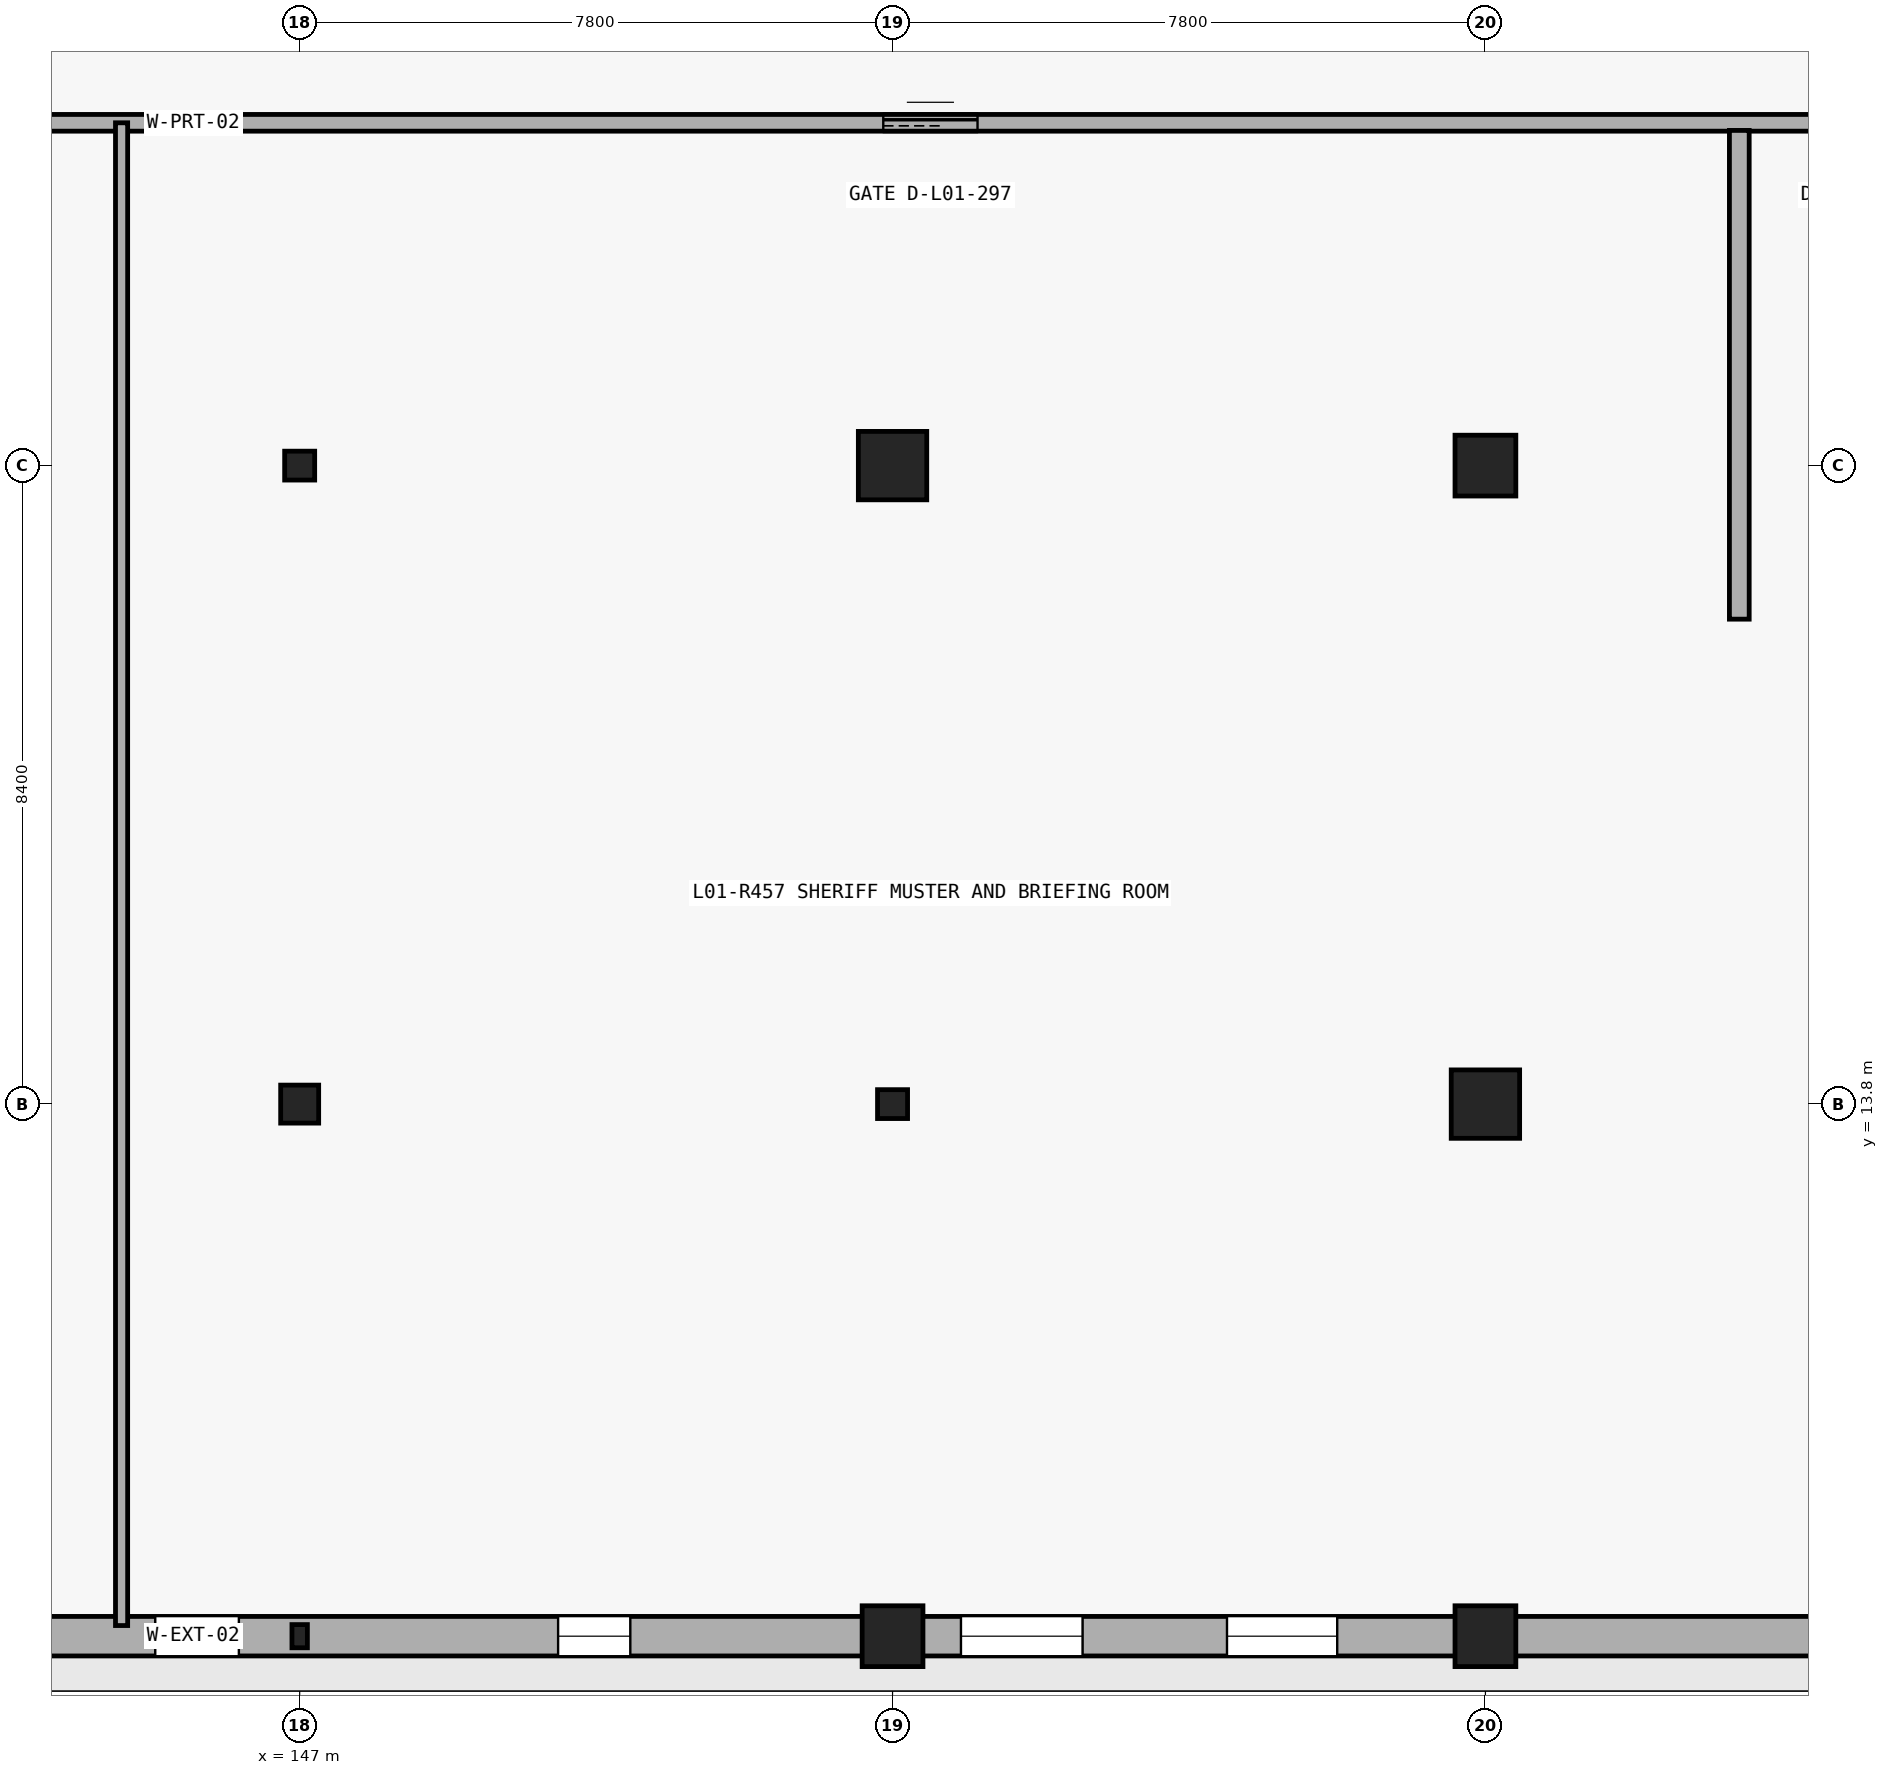
"""IFC4 building model, lengths in metres.
Left out: names, types, materials, properties, quantities, classifications, styles, units other than length and angle.
Written with IfcOpenShell. Run it as: python <this file> out.ifc"""

import sys

from ifc_helpers import new_model, si_unit, direction, frame, frame_2d, origin_with_axes, origin_2d_with_axis, place, context, subcontext, project, spatial, rectangle, hollow_rectangle, circle, i_section, extrude, element, fill, save


model = new_model("IFC4")
c1 = context("Model", 3, precision=1e-05, world=origin_with_axes(), true_north=direction((0.0, 1.0)))
c2 = subcontext(c1, "Body", "Model", "MODEL_VIEW")
j1 = project(units=[si_unit("LENGTHUNIT", "METRE"), si_unit("PLANEANGLEUNIT", "RADIAN")], contexts=[c1])
p1 = place(None, origin_with_axes())
s1 = spatial("IfcSite", under=j1, at=p1, CompositionType="ELEMENT")
p2 = place(p1, origin_with_axes())
s2 = spatial("IfcBuilding", under=s1, at=p2, CompositionType="ELEMENT")
p3 = place(p2, frame((0.0, 0.0, 5.4), z_axis=(0.0, 0.0, 1.0), x_axis=(1.0, 0.0, 0.0)))
s3 = spatial("IfcBuildingStorey", under=s2, at=p3, CompositionType="ELEMENT", Elevation=5.4)
p4 = place(None, frame((121.8, 6.8, 5.4), z_axis=(0.0, 0.0, 1.0), x_axis=(1.0, 0.0, 0.0)))
e1 = element("IfcWall", 1, at=p4, inside=s3, PredefinedType="SOLIDWALL", context=c2, shape_type="SweptSolid", body=[
    extrude(rectangle(XDim=47.6, YDim=0.52, at=frame_2d((23.8, 0.0), x_axis=(1.0, 0.0))), origin_with_axes(), (0.0, 0.0, 1.0), 4.744),
])
p5 = place(None, frame((125.2, 6.8, 8.1), z_axis=(0.0, 0.0, 1.0), x_axis=(1.0, 0.0, 0.0)))
e2 = element("IfcOpeningElement", 2, at=p5, cuts=e1, PredefinedType="OPENING", context=c2, shape_type="SweptSolid", body=[
    extrude(rectangle(XDim=2.4, YDim=1.4, at=frame_2d((0.0, 0.7), x_axis=(1.0, 0.0))), frame((0.0, 0.27, 0.0), z_axis=(0.0, -1.0, 0.0), x_axis=(1.0, 0.0, 0.0)), (0.0, 0.0, 1.0), 0.54),
])
p6 = place(None, frame((128.55, 6.8, 8.1), z_axis=(0.0, 0.0, 1.0), x_axis=(1.0, 0.0, 0.0)))
e3 = element("IfcOpeningElement", 3, at=p6, cuts=e1, PredefinedType="OPENING", context=c2, shape_type="SweptSolid", body=[
    extrude(rectangle(XDim=2.1, YDim=1.3, at=frame_2d((0.0, 0.65), x_axis=(1.0, 0.0))), frame((0.0, 0.27, 0.0), z_axis=(0.0, -1.0, 0.0), x_axis=(1.0, 0.0, 0.0)), (0.0, 0.0, 1.0), 0.54),
])
p7 = place(None, frame((133.7, 6.8, 8.15), z_axis=(0.0, 0.0, 1.0), x_axis=(1.0, 0.0, 0.0)))
e4 = element("IfcOpeningElement", 4, at=p7, cuts=e1, PredefinedType="OPENING", context=c2, shape_type="SweptSolid", body=[
    extrude(rectangle(XDim=1.8, YDim=1.2, at=frame_2d((0.0, 0.6), x_axis=(1.0, 0.0))), frame((0.0, 0.27, 0.0), z_axis=(0.0, -1.0, 0.0), x_axis=(1.0, 0.0, 0.0)), (0.0, 0.0, 1.0), 0.54),
])
p8 = place(None, frame((137.0, 6.8, 6.3), z_axis=(0.0, 0.0, 1.0), x_axis=(1.0, 0.0, 0.0)))
e5 = element("IfcOpeningElement", 5, at=p8, cuts=e1, PredefinedType="OPENING", context=c2, shape_type="SweptSolid", body=[
    extrude(rectangle(XDim=1.4, YDim=2.2, at=frame_2d((0.0, 1.1), x_axis=(1.0, 0.0))), frame((0.0, 0.27, 0.0), z_axis=(0.0, -1.0, 0.0), x_axis=(1.0, 0.0, 0.0)), (0.0, 0.0, 1.0), 0.54),
])
p9 = place(None, frame((142.225, 6.8, 6.3), z_axis=(0.0, 0.0, 1.0), x_axis=(1.0, 0.0, 0.0)))
e6 = element("IfcOpeningElement", 6, at=p9, cuts=e1, PredefinedType="OPENING", context=c2, shape_type="SweptSolid", body=[
    extrude(rectangle(XDim=1.25, YDim=2.1, at=frame_2d((0.0, 1.05), x_axis=(1.0, 0.0))), frame((0.0, 0.27, 0.0), z_axis=(0.0, -1.0, 0.0), x_axis=(1.0, 0.0, 0.0)), (0.0, 0.0, 1.0), 0.54),
])
p10 = place(None, frame((145.65, 6.8, 6.35), z_axis=(0.0, 0.0, 1.0), x_axis=(1.0, 0.0, 0.0)))
e7 = element("IfcOpeningElement", 7, at=p10, cuts=e1, PredefinedType="OPENING", context=c2, shape_type="SweptSolid", body=[
    extrude(rectangle(XDim=1.1, YDim=2.0, at=frame_2d((0.0, 1.0), x_axis=(1.0, 0.0))), frame((0.0, 0.27, 0.0), z_axis=(0.0, -1.0, 0.0), x_axis=(1.0, 0.0, 0.0)), (0.0, 0.0, 1.0), 0.54),
])
p11 = place(None, frame((150.875, 6.8, 6.35), z_axis=(0.0, 0.0, 1.0), x_axis=(1.0, 0.0, 0.0)))
e8 = element("IfcOpeningElement", 8, at=p11, cuts=e1, PredefinedType="OPENING", context=c2, shape_type="SweptSolid", body=[
    extrude(rectangle(XDim=0.95, YDim=1.95, at=frame_2d((0.0, 0.975), x_axis=(1.0, 0.0))), frame((0.0, 0.27, 0.0), z_axis=(0.0, -1.0, 0.0), x_axis=(1.0, 0.0, 0.0)), (0.0, 0.0, 1.0), 0.54),
])
p12 = place(None, frame((156.5, 6.8, 6.25), z_axis=(0.0, 0.0, 1.0), x_axis=(1.0, 0.0, 0.0)))
e9 = element("IfcOpeningElement", 9, at=p12, cuts=e1, PredefinedType="OPENING", context=c2, shape_type="SweptSolid", body=[
    extrude(rectangle(XDim=1.6, YDim=3.1, at=frame_2d((0.0, 1.55), x_axis=(1.0, 0.0))), frame((0.0, 0.27, 0.0), z_axis=(0.0, -1.0, 0.0), x_axis=(1.0, 0.0, 0.0)), (0.0, 0.0, 1.0), 0.54),
])
p13 = place(None, frame((159.925, 6.8, 6.3), z_axis=(0.0, 0.0, 1.0), x_axis=(1.0, 0.0, 0.0)))
e10 = element("IfcOpeningElement", 10, at=p13, cuts=e1, PredefinedType="OPENING", context=c2, shape_type="SweptSolid", body=[
    extrude(rectangle(XDim=1.45, YDim=2.85, at=frame_2d((0.0, 1.425), x_axis=(1.0, 0.0))), frame((0.0, 0.27, 0.0), z_axis=(0.0, -1.0, 0.0), x_axis=(1.0, 0.0, 0.0)), (0.0, 0.0, 1.0), 0.54),
])
p14 = place(None, frame((121.94, 26.71, 5.4), z_axis=(0.0, 0.0, 1.0), x_axis=(1.0, 0.0, 0.0)))
e11 = element("IfcWall", 11, at=p14, inside=s3, PredefinedType="PARTITIONING", context=c2, shape_type="SweptSolid", body=[
    extrude(rectangle(XDim=47.32, YDim=0.22, at=frame_2d((23.66, 0.0), x_axis=(1.0, 0.0))), origin_with_axes(), (0.0, 0.0, 1.0), 5.08),
])
p15 = place(None, frame((133.46, 26.71, 5.4), z_axis=(0.0, 0.0, 1.0), x_axis=(1.0, 0.0, 0.0)))
e12 = element("IfcOpeningElement", 12, at=p15, cuts=e11, PredefinedType="OPENING", context=c2, shape_type="SweptSolid", body=[
    extrude(rectangle(XDim=1.76, YDim=2.26, at=frame_2d((0.0, 1.13), x_axis=(1.0, 0.0))), frame((0.0, 0.12, 0.0), z_axis=(0.0, -1.0, 0.0), x_axis=(1.0, 0.0, 0.0)), (0.0, 0.0, 1.0), 0.24),
])
p16 = place(None, frame((155.298, 26.71, 5.4), z_axis=(0.0, 0.0, 1.0), x_axis=(1.0, 0.0, 0.0)))
e13 = element("IfcOpeningElement", 13, at=p16, cuts=e11, PredefinedType="OPENING", context=c2, shape_type="SweptSolid", body=[
    extrude(rectangle(XDim=1.24, YDim=2.22, at=frame_2d((0.0, 1.11), x_axis=(1.0, 0.0))), frame((0.0, 0.12, 0.0), z_axis=(0.0, -1.0, 0.0), x_axis=(1.0, 0.0, 0.0)), (0.0, 0.0, 1.0), 0.24),
])
p17 = place(None, frame((167.438, 26.71, 5.4), z_axis=(0.0, 0.0, 1.0), x_axis=(1.0, 0.0, 0.0)))
e14 = element("IfcOpeningElement", 14, at=p17, cuts=e11, PredefinedType="OPENING", context=c2, shape_type="SweptSolid", body=[
    extrude(rectangle(XDim=0.91, YDim=2.12, at=frame_2d((0.0, 1.06), x_axis=(1.0, 0.0))), frame((0.0, 0.12, 0.0), z_axis=(0.0, -1.0, 0.0), x_axis=(1.0, 0.0, 0.0)), (0.0, 0.0, 1.0), 0.24),
])
p18 = place(None, frame((165.94, 20.18, 5.4), z_axis=(0.0, 0.0, 1.0), x_axis=(0.0, 1.0, 0.0)))
e15 = element("IfcWall", 15, at=p18, inside=s3, PredefinedType="PLUMBINGWALL", context=c2, shape_type="SweptSolid", body=[
    extrude(rectangle(XDim=6.43, YDim=0.26, at=frame_2d((3.215, 0.0), x_axis=(1.0, 0.0))), origin_with_axes(), (0.0, 0.0, 1.0), 5.08),
])
p19 = place(None, frame((144.657, 6.94, 5.4), z_axis=(0.0, 0.0, 1.0), x_axis=(0.0, 1.0, 0.0)))
e16 = element("IfcWall", 16, at=p19, inside=s3, PredefinedType="PARTITIONING", context=c2, shape_type="SweptSolid", body=[
    extrude(rectangle(XDim=19.77, YDim=0.16, at=frame_2d((9.885, 0.0), x_axis=(1.0, 0.0))), origin_with_axes(), (0.0, 0.0, 1.0), 5.08),
])
p20 = place(None, frame((147.0, 6.8, 5.4), z_axis=(0.0, 0.0, 1.0), x_axis=(1.0, 0.0, 0.0)))
e17 = element("IfcColumn", 17, at=p20, inside=s3, PredefinedType="COLUMN", context=c2, shape_type="SweptSolid", body=[
    extrude(hollow_rectangle(XDim=0.203, YDim=0.305, WallThickness=0.013, InnerFilletRadius=0.025, OuterFilletRadius=0.013, at=origin_2d_with_axis()), origin_with_axes(), (0.0, 0.0, 1.0), 5.4),
])
p21 = place(None, frame((147.0, 13.8, 5.4), z_axis=(0.0, 0.0, 1.0), x_axis=(1.0, 0.0, 0.0)))
e18 = element("IfcColumn", 18, at=p21, inside=s3, PredefinedType="COLUMN", context=c2, shape_type="SweptSolid", body=[
    extrude(i_section(OverallWidth=0.5, OverallDepth=0.5, WebThickness=0.022, FlangeThickness=0.036, at=origin_2d_with_axis()), origin_with_axes(), (0.0, 0.0, 1.0), 5.4),
])
p22 = place(None, frame((147.0, 22.2, 5.4), z_axis=(0.0, 0.0, 1.0), x_axis=(1.0, 0.0, 0.0)))
e19 = element("IfcColumn", 19, at=p22, inside=s3, PredefinedType="COLUMN", context=c2, shape_type="SweptSolid", body=[
    extrude(i_section(OverallWidth=0.395, OverallDepth=0.38, WebThickness=0.019, FlangeThickness=0.03, at=origin_2d_with_axis()), origin_with_axes(), (0.0, 0.0, 1.0), 5.4),
])
p23 = place(None, frame((154.8, 6.8, 5.4), z_axis=(0.0, 0.0, 1.0), x_axis=(1.0, 0.0, 0.0)))
e20 = element("IfcColumn", 20, at=p23, inside=s3, PredefinedType="COLUMN", context=c2, shape_type="SweptSolid", body=[
    extrude(circle(Radius=0.4, at=origin_2d_with_axis()), origin_with_axes(), (0.0, 0.0, 1.0), 5.4),
])
p24 = place(None, frame((154.8, 13.8, 5.4), z_axis=(0.0, 0.0, 1.0), x_axis=(1.0, 0.0, 0.0)))
e21 = element("IfcColumn", 21, at=p24, inside=s3, PredefinedType="COLUMN", context=c2, shape_type="SweptSolid", body=[
    extrude(i_section(OverallWidth=0.395, OverallDepth=0.38, WebThickness=0.019, FlangeThickness=0.03, at=origin_2d_with_axis()), origin_with_axes(), (0.0, 0.0, 1.0), 5.4),
])
p25 = place(None, frame((154.8, 22.2, 5.4), z_axis=(0.0, 0.0, 1.0), x_axis=(1.0, 0.0, 0.0)))
e22 = element("IfcColumn", 22, at=p25, inside=s3, PredefinedType="COLUMN", context=c2, shape_type="SweptSolid", body=[
    extrude(rectangle(XDim=0.9, YDim=0.9, at=origin_2d_with_axis()), origin_with_axes(), (0.0, 0.0, 1.0), 5.4),
])
p26 = place(None, frame((162.6, 6.8, 5.4), z_axis=(0.0, 0.0, 1.0), x_axis=(1.0, 0.0, 0.0)))
e23 = element("IfcColumn", 23, at=p26, inside=s3, PredefinedType="COLUMN", context=c2, shape_type="SweptSolid", body=[
    extrude(circle(Radius=0.4, at=origin_2d_with_axis()), origin_with_axes(), (0.0, 0.0, 1.0), 5.4),
])
p27 = place(None, frame((162.6, 13.8, 5.4), z_axis=(0.0, 0.0, 1.0), x_axis=(1.0, 0.0, 0.0)))
e24 = element("IfcColumn", 24, at=p27, inside=s3, PredefinedType="COLUMN", context=c2, shape_type="SweptSolid", body=[
    extrude(rectangle(XDim=0.9, YDim=0.9, at=origin_2d_with_axis()), origin_with_axes(), (0.0, 0.0, 1.0), 5.4),
])
p28 = place(None, frame((162.6, 22.2, 5.4), z_axis=(0.0, 0.0, 1.0), x_axis=(1.0, 0.0, 0.0)))
e25 = element("IfcColumn", 25, at=p28, inside=s3, PredefinedType="COLUMN", context=c2, shape_type="SweptSolid", body=[
    extrude(rectangle(XDim=0.8, YDim=0.8, at=origin_2d_with_axis()), origin_with_axes(), (0.0, 0.0, 1.0), 5.4),
])
p29 = place(None, frame((155.298, 26.71, 5.4), z_axis=(0.0, 0.0, 1.0), x_axis=(1.0, 0.0, 0.0)))
e26 = element("IfcDoor", 26, at=p29, inside=s3, OperationType="SLIDING_TO_LEFT", PredefinedType="GATE", context=c2, shape_type="SweptSolid", body=[
    extrude(rectangle(XDim=1.24, YDim=2.22, at=frame_2d((0.0, 1.11), x_axis=(1.0, 0.0))), frame((0.0, 0.04, 0.0), z_axis=(0.0, -1.0, 0.0), x_axis=(1.0, 0.0, 0.0)), (0.0, 0.0, 1.0), 0.08),
])
fill(e13, e26)
p30 = place(None, frame((145.65, 6.8, 6.35), z_axis=(0.0, 0.0, 1.0), x_axis=(1.0, 0.0, 0.0)))
e27 = element("IfcWindow", 27, at=p30, inside=s3, PartitioningType="SINGLE_PANEL", PredefinedType="WINDOW", context=c2, shape_type="SweptSolid", body=[
    extrude(rectangle(XDim=1.1, YDim=2.0, at=frame_2d((0.0, 1.0), x_axis=(1.0, 0.0))), frame((0.0, 0.03, 0.0), z_axis=(0.0, -1.0, 0.0), x_axis=(1.0, 0.0, 0.0)), (0.0, 0.0, 1.0), 0.06),
])
fill(e7, e27)
p31 = place(None, frame((150.875, 6.8, 6.35), z_axis=(0.0, 0.0, 1.0), x_axis=(1.0, 0.0, 0.0)))
e28 = element("IfcWindow", 28, at=p31, inside=s3, PartitioningType="SINGLE_PANEL", PredefinedType="WINDOW", context=c2, shape_type="SweptSolid", body=[
    extrude(rectangle(XDim=0.95, YDim=1.95, at=frame_2d((0.0, 0.975), x_axis=(1.0, 0.0))), frame((0.0, 0.03, 0.0), z_axis=(0.0, -1.0, 0.0), x_axis=(1.0, 0.0, 0.0)), (0.0, 0.0, 1.0), 0.06),
])
fill(e8, e28)
p32 = place(None, frame((156.5, 6.8, 6.25), z_axis=(0.0, 0.0, 1.0), x_axis=(1.0, 0.0, 0.0)))
e29 = element("IfcWindow", 29, at=p32, inside=s3, PartitioningType="SINGLE_PANEL", PredefinedType="WINDOW", context=c2, shape_type="SweptSolid", body=[
    extrude(rectangle(XDim=1.6, YDim=3.1, at=frame_2d((0.0, 1.55), x_axis=(1.0, 0.0))), frame((0.0, 0.03, 0.0), z_axis=(0.0, -1.0, 0.0), x_axis=(1.0, 0.0, 0.0)), (0.0, 0.0, 1.0), 0.06),
])
fill(e9, e29)
p33 = place(None, frame((159.925, 6.8, 6.3), z_axis=(0.0, 0.0, 1.0), x_axis=(1.0, 0.0, 0.0)))
e30 = element("IfcWindow", 30, at=p33, inside=s3, PartitioningType="SINGLE_PANEL", PredefinedType="WINDOW", context=c2, shape_type="SweptSolid", body=[
    extrude(rectangle(XDim=1.45, YDim=2.85, at=frame_2d((0.0, 1.425), x_axis=(1.0, 0.0))), frame((0.0, 0.03, 0.0), z_axis=(0.0, -1.0, 0.0), x_axis=(1.0, 0.0, 0.0)), (0.0, 0.0, 1.0), 0.06),
])
fill(e10, e30)
save(model, sys.argv[1])
